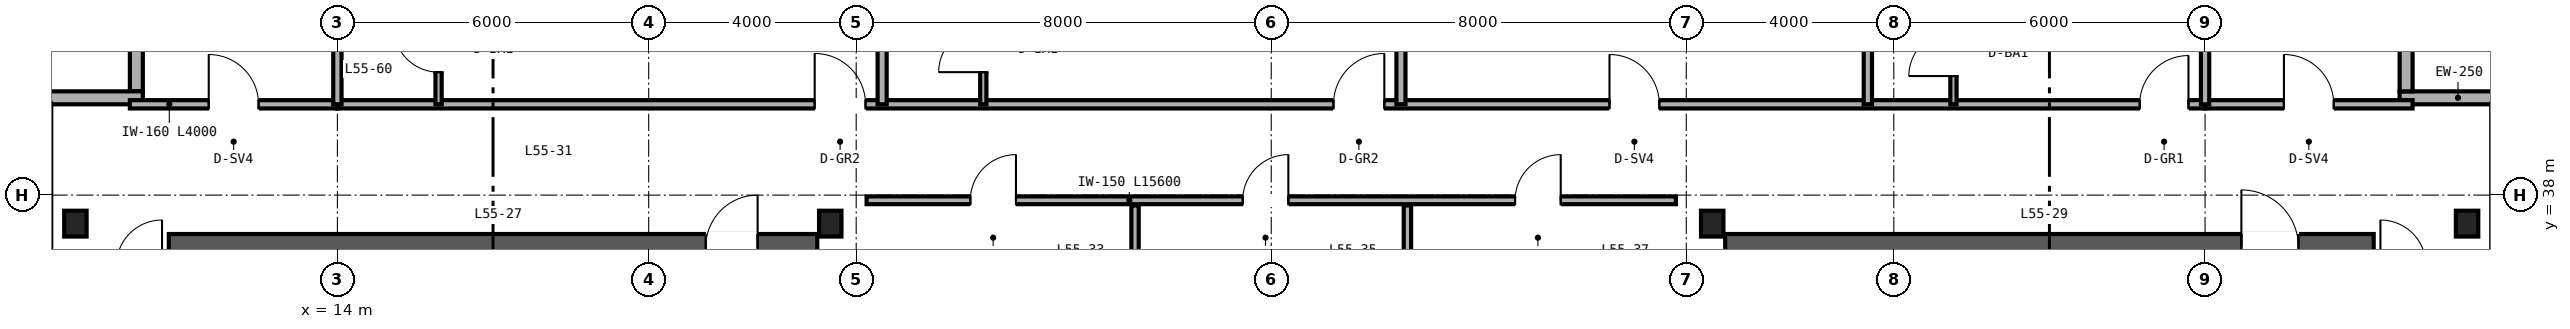
"""IFC4 building model, lengths in metres.
Left out: names, types, materials, properties, quantities, classifications, styles, units other than length and angle.
Written with IfcOpenShell. Run it as: python <this file> out.ifc"""

import sys

from ifc_helpers import new_model, si_unit, direction, frame, frame_2d, origin, origin_2d, place, context, subcontext, project, spatial, rectangle, i_section, extrude, source, transform, mapped, element, fill, save


model = new_model("IFC4")
c1 = context("Model", 3, precision=1e-05, world=origin(), true_north=direction((0.0, 1.0)))
c2 = subcontext(c1, "Body", "Model", "MODEL_VIEW")
j1 = project(units=[si_unit("LENGTHUNIT", "METRE"), si_unit("PLANEANGLEUNIT", "RADIAN")], contexts=[c1])
p1 = place(None, origin())
s1 = spatial("IfcSite", under=j1, at=p1, CompositionType="ELEMENT")
p2 = place(p1, origin())
s2 = spatial("IfcBuilding", under=s1, at=p2, CompositionType="ELEMENT")
p3 = place(p2, frame((0.0, 0.0, 217.2)))
s3 = spatial("IfcBuildingStorey", under=s2, at=p3, CompositionType="ELEMENT", Elevation=217.2)
p4 = place(p3, frame((10.75, 37.0, 0.0), z_axis=(0.0, 0.0, 1.0), x_axis=(1.0, 0.0, 0.0)))
e1 = element("IfcWall", 1, at=p4, inside=s3, PredefinedType="SHEAR", context=c2, shape_type="SweptSolid", body=[
    extrude(rectangle(XDim=12.5, YDim=0.5, at=frame_2d((6.25, 0.0))), origin(), (0.0, 0.0, 1.0), 3.28),
])
p5 = place(p4, frame((10.35, 0.0, 0.0)))
e2 = element("IfcOpeningElement", 2, at=p5, cuts=e1, PredefinedType="OPENING", context=c2, shape_type="SweptSolid", body=[
    extrude(rectangle(XDim=1.0, YDim=2.15, at=frame_2d((0.5, 1.075))), frame((0.0, 0.26, 0.0), z_axis=(0.0, -1.0, 0.0), x_axis=(1.0, 0.0, 0.0)), (0.0, 0.0, 1.0), 0.52),
])
p6 = place(p3, frame((40.75, 37.0, 0.0), z_axis=(0.0, 0.0, 1.0), x_axis=(1.0, 0.0, 0.0)))
e3 = element("IfcWall", 3, at=p6, inside=s3, PredefinedType="SHEAR", context=c2, shape_type="SweptSolid", body=[
    extrude(rectangle(XDim=12.5, YDim=0.5, at=frame_2d((6.25, 0.0))), origin(), (0.0, 0.0, 1.0), 3.28),
])
p7 = place(p6, frame((9.95, 0.0, 0.0)))
e4 = element("IfcOpeningElement", 4, at=p7, cuts=e3, PredefinedType="OPENING", context=c2, shape_type="SweptSolid", body=[
    extrude(rectangle(XDim=1.1, YDim=2.15, at=frame_2d((0.55, 1.075))), frame((0.0, 0.26, 0.0), z_axis=(0.0, -1.0, 0.0), x_axis=(1.0, 0.0, 0.0)), (0.0, 0.0, 1.0), 0.52),
])
m1 = source(origin(), c2, "Body", "SweptSolid", [
    extrude(i_section(OverallWidth=0.432, OverallDepth=0.498, WebThickness=0.056, FlangeThickness=0.089, FilletRadius=0.025, at=origin_2d()), origin(), (0.0, 0.0, 1.0), 3.28),
])
for number, where, z_axis, x_axis in (
    (5, (8.95, 37.45, 0.0), (0.0, 0.0, 1.0), (1.0, 0.0, 0.0)),
    (6, (23.5, 37.45, 0.0), (0.0, 0.0, 1.0), (1.0, 0.0, 0.0)),
    (7, (40.5, 37.45, 0.0), (0.0, 0.0, 1.0), (1.0, 0.0, 0.0)),
    (8, (55.05, 37.45, 0.0), (0.0, 0.0, 1.0), (1.0, 0.0, 0.0)),
):
    element("IfcColumn", number, at=place(p3, frame(where, z_axis=z_axis, x_axis=x_axis)), inside=s3, PredefinedType="COLUMN", context=c2, shape_type="MappedRepresentation", body=[
        mapped(m1, transform((0.0, 0.0, 0.0), scale=1.0)),
    ])
p8 = place(p3, frame((56.0, 39.875, 0.0), z_axis=(0.0, 0.0, 1.0), x_axis=(-1.0, 0.0, 0.0)))
e9 = element("IfcWall", 9, at=p8, inside=s3, PredefinedType="SOLIDWALL", context=c2, shape_type="SweptSolid", body=[
    extrude(rectangle(XDim=2.25, YDim=0.25, at=frame_2d((1.125, 0.0))), origin(), (0.0, 0.0, 1.0), 3.28),
])
for number, where, z_axis, x_axis in (
    (10, (53.875, 40.0, 0.0), (0.0, 0.0, 1.0), (0.0, 1.0, 0.0)),
    (11, (10.125, 42.0, 0.0), (0.0, 0.0, 1.0), (0.0, -1.0, 0.0)),
):
    element("IfcWall", number, at=place(p3, frame(where, z_axis=z_axis, x_axis=x_axis)), inside=s3, PredefinedType="SOLIDWALL", context=c2, shape_type="SweptSolid", body=[
        extrude(rectangle(XDim=2.0, YDim=0.25, at=frame_2d((1.0, 0.0))), origin(), (0.0, 0.0, 1.0), 3.28),
    ])
p9 = place(p3, frame((10.25, 39.875, 0.0), z_axis=(0.0, 0.0, 1.0), x_axis=(-1.0, 0.0, 0.0)))
e12 = element("IfcWall", 12, at=p9, inside=s3, PredefinedType="SOLIDWALL", context=c2, shape_type="SweptSolid", body=[
    extrude(rectangle(XDim=2.25, YDim=0.25, at=frame_2d((1.125, 0.0))), origin(), (0.0, 0.0, 1.0), 3.28),
])
p10 = place(p3, frame((24.2, 37.9, 0.0), z_axis=(0.0, 0.0, 1.0), x_axis=(1.0, 0.0, 0.0)))
e13 = element("IfcWall", 13, at=p10, inside=s3, PredefinedType="PARTITIONING", context=c2, shape_type="SweptSolid", body=[
    extrude(rectangle(XDim=15.6, YDim=0.15, at=frame_2d((7.8, 0.0))), origin(), (0.0, 0.0, 1.0), 3.28),
])
p11 = place(p10, frame((2.0, 0.0, 0.0)))
e14 = element("IfcOpeningElement", 14, at=p11, cuts=e13, PredefinedType="OPENING", context=c2, shape_type="SweptSolid", body=[
    extrude(rectangle(XDim=0.88, YDim=2.15, at=frame_2d((0.44, 1.075))), frame((0.0, 0.085, 0.0), z_axis=(0.0, -1.0, 0.0), x_axis=(1.0, 0.0, 0.0)), (0.0, 0.0, 1.0), 0.17),
])
p12 = place(p10, frame((7.25, 0.0, 0.0)))
e15 = element("IfcOpeningElement", 15, at=p12, cuts=e13, PredefinedType="OPENING", context=c2, shape_type="SweptSolid", body=[
    extrude(rectangle(XDim=0.88, YDim=2.15, at=frame_2d((0.44, 1.075))), frame((0.0, 0.085, 0.0), z_axis=(0.0, -1.0, 0.0), x_axis=(1.0, 0.0, 0.0)), (0.0, 0.0, 1.0), 0.17),
])
p13 = place(p10, frame((12.5, 0.0, 0.0)))
e16 = element("IfcOpeningElement", 16, at=p13, cuts=e13, PredefinedType="OPENING", context=c2, shape_type="SweptSolid", body=[
    extrude(rectangle(XDim=0.88, YDim=2.15, at=frame_2d((0.44, 1.075))), frame((0.0, 0.085, 0.0), z_axis=(0.0, -1.0, 0.0), x_axis=(1.0, 0.0, 0.0)), (0.0, 0.0, 1.0), 0.17),
])
for number, where, z_axis, x_axis in (
    (17, (29.375, 36.12, 0.0), (0.0, 0.0, 1.0), (0.0, 1.0, 0.0)),
    (18, (34.625, 36.12, 0.0), (0.0, 0.0, 1.0), (0.0, 1.0, 0.0)),
):
    element("IfcWall", number, at=place(p3, frame(where, z_axis=z_axis, x_axis=x_axis)), inside=s3, PredefinedType="PARTITIONING", context=c2, shape_type="SweptSolid", body=[
        extrude(rectangle(XDim=1.68, YDim=0.142, at=frame_2d((0.84, 0.0))), origin(), (0.0, 0.0, 1.0), 3.28),
    ])
p14 = place(p3, frame((10.0, 39.75, 0.0), z_axis=(0.0, 0.0, 1.0), x_axis=(1.0, 0.0, 0.0)))
e19 = element("IfcWall", 19, at=p14, inside=s3, PredefinedType="PARTITIONING", context=c2, shape_type="SweptSolid", body=[
    extrude(rectangle(XDim=4.0, YDim=0.16, at=frame_2d((2.0, 0.0))), origin(), (0.0, 0.0, 1.0), 3.28),
])
p15 = place(p14, frame((1.52, 0.0, 0.0)))
e20 = element("IfcOpeningElement", 20, at=p15, cuts=e19, PredefinedType="OPENING", context=c2, shape_type="SweptSolid", body=[
    extrude(rectangle(XDim=0.96, YDim=2.15, at=frame_2d((0.48, 1.075))), frame((0.0, 0.09, 0.0), z_axis=(0.0, -1.0, 0.0), x_axis=(1.0, 0.0, 0.0)), (0.0, 0.0, 1.0), 0.18),
])
p16 = place(p3, frame((50.0, 39.75, 0.0), z_axis=(0.0, 0.0, 1.0), x_axis=(1.0, 0.0, 0.0)))
e21 = element("IfcWall", 21, at=p16, inside=s3, PredefinedType="PARTITIONING", context=c2, shape_type="SweptSolid", body=[
    extrude(rectangle(XDim=4.0, YDim=0.16, at=frame_2d((2.0, 0.0))), origin(), (0.0, 0.0, 1.0), 3.28),
])
p17 = place(p16, frame((1.52, 0.0, 0.0)))
e22 = element("IfcOpeningElement", 22, at=p17, cuts=e21, PredefinedType="OPENING", context=c2, shape_type="SweptSolid", body=[
    extrude(rectangle(XDim=0.96, YDim=2.15, at=frame_2d((0.48, 1.075))), frame((0.0, 0.09, 0.0), z_axis=(0.0, -1.0, 0.0), x_axis=(1.0, 0.0, 0.0)), (0.0, 0.0, 1.0), 0.18),
])
p18 = place(p3, frame((14.0, 39.75, 0.0), z_axis=(0.0, 0.0, 1.0), x_axis=(1.0, 0.0, 0.0)))
e23 = element("IfcWall", 23, at=p18, inside=s3, PredefinedType="PARTITIONING", context=c2, shape_type="SweptSolid", body=[
    extrude(rectangle(XDim=36.0, YDim=0.16, at=frame_2d((18.0, 0.0))), origin(), (0.0, 0.0, 1.0), 2.823),
])
p19 = place(p18, frame((9.2, 0.0, 0.0)))
e24 = element("IfcOpeningElement", 24, at=p19, cuts=e23, PredefinedType="OPENING", context=c2, shape_type="SweptSolid", body=[
    extrude(rectangle(XDim=0.98, YDim=2.2, at=frame_2d((0.49, 1.1))), frame((0.0, 0.09, 0.0), z_axis=(0.0, -1.0, 0.0), x_axis=(1.0, 0.0, 0.0)), (0.0, 0.0, 1.0), 0.18),
])
p20 = place(p18, frame((19.2, 0.0, 0.0)))
e25 = element("IfcOpeningElement", 25, at=p20, cuts=e23, PredefinedType="OPENING", context=c2, shape_type="SweptSolid", body=[
    extrude(rectangle(XDim=0.98, YDim=2.2, at=frame_2d((0.49, 1.1))), frame((0.0, 0.09, 0.0), z_axis=(0.0, -1.0, 0.0), x_axis=(1.0, 0.0, 0.0)), (0.0, 0.0, 1.0), 0.18),
])
p21 = place(p18, frame((24.52, 0.0, 0.0)))
e26 = element("IfcOpeningElement", 26, at=p21, cuts=e23, PredefinedType="OPENING", context=c2, shape_type="SweptSolid", body=[
    extrude(rectangle(XDim=0.96, YDim=2.15, at=frame_2d((0.48, 1.075))), frame((0.0, 0.09, 0.0), z_axis=(0.0, -1.0, 0.0), x_axis=(1.0, 0.0, 0.0)), (0.0, 0.0, 1.0), 0.18),
])
p22 = place(p18, frame((34.74, 0.0, 0.0)))
e27 = element("IfcOpeningElement", 27, at=p22, cuts=e23, PredefinedType="OPENING", context=c2, shape_type="SweptSolid", body=[
    extrude(rectangle(XDim=0.94, YDim=2.15, at=frame_2d((0.47, 1.075))), frame((0.0, 0.09, 0.0), z_axis=(0.0, -1.0, 0.0), x_axis=(1.0, 0.0, 0.0)), (0.0, 0.0, 1.0), 0.18),
])
for number, where, z_axis, x_axis in (
    (28, (14.0, 39.75, 0.0), (0.0, 0.0, 1.0), (0.0, 1.0, 0.0)),
    (29, (50.0, 39.75, 0.0), (0.0, 0.0, 1.0), (0.0, 1.0, 0.0)),
):
    element("IfcWall", number, at=place(p3, frame(where, z_axis=z_axis, x_axis=x_axis)), inside=s3, PredefinedType="PARTITIONING", context=c2, shape_type="SweptSolid", body=[
        extrude(rectangle(XDim=5.89, YDim=0.16, at=frame_2d((2.945, 0.0))), origin(), (0.0, 0.0, 1.0), 2.587),
    ])
p23 = place(p3, frame((24.5, 39.75, 0.0), z_axis=(0.0, 0.0, 1.0), x_axis=(0.0, 1.0, 0.0)))
e30 = element("IfcWall", 30, at=p23, inside=s3, PredefinedType="PARTITIONING", context=c2, shape_type="SweptSolid", body=[
    extrude(rectangle(XDim=5.89, YDim=0.175, at=frame_2d((2.945, 0.0))), origin(), (0.0, 0.0, 1.0), 2.36),
])
p24 = place(p3, frame((15.95, 39.75, 0.0), z_axis=(0.0, 0.0, 1.0), x_axis=(0.0, 1.0, 0.0)))
e31 = element("IfcWall", 31, at=p24, inside=s3, PredefinedType="PARTITIONING", context=c2, shape_type="SweptSolid", body=[
    extrude(rectangle(XDim=2.1, YDim=0.12, at=frame_2d((1.05, 0.0))), origin(), (0.0, 0.0, 1.0), 3.28),
])
p25 = place(p24, frame((0.62, 0.0, 0.0)))
e32 = element("IfcOpeningElement", 32, at=p25, cuts=e31, PredefinedType="OPENING", context=c2, shape_type="SweptSolid", body=[
    extrude(rectangle(XDim=0.86, YDim=2.1, at=frame_2d((0.43, 1.05))), frame((0.0, 0.07, 0.0), z_axis=(0.0, -1.0, 0.0), x_axis=(1.0, 0.0, 0.0)), (0.0, 0.0, 1.0), 0.14),
])
p26 = place(p3, frame((34.5, 39.75, 0.0), z_axis=(0.0, 0.0, 1.0), x_axis=(0.0, 1.0, 0.0)))
e33 = element("IfcWall", 33, at=p26, inside=s3, PredefinedType="PARTITIONING", context=c2, shape_type="SweptSolid", body=[
    extrude(rectangle(XDim=5.89, YDim=0.175, at=frame_2d((2.945, 0.0))), origin(), (0.0, 0.0, 1.0), 2.36),
])
p27 = place(p3, frame((26.45, 39.75, 0.0), z_axis=(0.0, 0.0, 1.0), x_axis=(0.0, 1.0, 0.0)))
e34 = element("IfcWall", 34, at=p27, inside=s3, PredefinedType="PARTITIONING", context=c2, shape_type="SweptSolid", body=[
    extrude(rectangle(XDim=2.1, YDim=0.12, at=frame_2d((1.05, 0.0))), origin(), (0.0, 0.0, 1.0), 3.28),
])
p28 = place(p27, frame((0.62, 0.0, 0.0)))
e35 = element("IfcOpeningElement", 35, at=p28, cuts=e34, PredefinedType="OPENING", context=c2, shape_type="SweptSolid", body=[
    extrude(rectangle(XDim=0.86, YDim=2.1, at=frame_2d((0.43, 1.05))), frame((0.0, 0.07, 0.0), z_axis=(0.0, -1.0, 0.0), x_axis=(1.0, 0.0, 0.0)), (0.0, 0.0, 1.0), 0.14),
])
p29 = place(p3, frame((43.5, 39.75, 0.0), z_axis=(0.0, 0.0, 1.0), x_axis=(0.0, 1.0, 0.0)))
e36 = element("IfcWall", 36, at=p29, inside=s3, PredefinedType="PARTITIONING", context=c2, shape_type="SweptSolid", body=[
    extrude(rectangle(XDim=5.89, YDim=0.16, at=frame_2d((2.945, 0.0))), origin(), (0.0, 0.0, 1.0), 2.743),
])
p30 = place(p3, frame((45.15, 39.75, 0.0), z_axis=(0.0, 0.0, 1.0), x_axis=(0.0, 1.0, 0.0)))
e37 = element("IfcWall", 37, at=p30, inside=s3, PredefinedType="PARTITIONING", context=c2, shape_type="SweptSolid", body=[
    extrude(rectangle(XDim=1.95, YDim=0.12, at=frame_2d((0.975, 0.0))), origin(), (0.0, 0.0, 1.0), 3.28),
])
p31 = place(p30, frame((0.545, 0.0, 0.0)))
e38 = element("IfcOpeningElement", 38, at=p31, cuts=e37, PredefinedType="OPENING", context=c2, shape_type="SweptSolid", body=[
    extrude(rectangle(XDim=0.86, YDim=2.1, at=frame_2d((0.43, 1.05))), frame((0.0, 0.07, 0.0), z_axis=(0.0, -1.0, 0.0), x_axis=(1.0, 0.0, 0.0)), (0.0, 0.0, 1.0), 0.14),
])
m2 = source(origin(), c2, "Body", "SweptSolid", [
    extrude(rectangle(XDim=1.0, YDim=2.15, at=frame_2d((0.5, 1.075))), frame((0.0, 0.025, 0.0), z_axis=(0.0, -1.0, 0.0), x_axis=(1.0, 0.0, 0.0)), (0.0, 0.0, 1.0), 0.05),
])
p32 = place(p5, origin())
e39 = element("IfcDoor", 39, at=p32, inside=s3, OperationType="SINGLE_SWING_RIGHT", PredefinedType="DOOR", context=c2, shape_type="MappedRepresentation", body=[
    mapped(m2, transform((0.0, 0.0, 0.0), scale=1.0)),
])
fill(e2, e39)
m3 = source(origin(), c2, "Body", "SweptSolid", [
    extrude(rectangle(XDim=1.1, YDim=2.15, at=frame_2d((0.55, 1.075))), frame((0.0, 0.025, 0.0), z_axis=(0.0, -1.0, 0.0), x_axis=(1.0, 0.0, 0.0)), (0.0, 0.0, 1.0), 0.05),
])
p33 = place(p7, origin())
e40 = element("IfcDoor", 40, at=p33, inside=s3, OperationType="SINGLE_SWING_LEFT", PredefinedType="DOOR", context=c2, shape_type="MappedRepresentation", body=[
    mapped(m3, transform((0.0, 0.0, 0.0), scale=1.0)),
])
fill(e4, e40)
m4 = source(origin(), c2, "Body", "SweptSolid", [
    extrude(rectangle(XDim=0.88, YDim=2.15, at=frame_2d((0.44, 1.075))), frame((0.0, 0.025, 0.0), z_axis=(0.0, -1.0, 0.0), x_axis=(1.0, 0.0, 0.0)), (0.0, 0.0, 1.0), 0.05),
])
p34 = place(p11, origin())
e41 = element("IfcDoor", 41, at=p34, inside=s3, OperationType="SINGLE_SWING_RIGHT", PredefinedType="DOOR", context=c2, shape_type="MappedRepresentation", body=[
    mapped(m4, transform((0.0, 0.0, 0.0), scale=1.0)),
])
fill(e14, e41)
p35 = place(p12, origin())
e42 = element("IfcDoor", 42, at=p35, inside=s3, OperationType="SINGLE_SWING_RIGHT", PredefinedType="DOOR", context=c2, shape_type="MappedRepresentation", body=[
    mapped(m4, transform((0.0, 0.0, 0.0), scale=1.0)),
])
fill(e15, e42)
p36 = place(p13, origin())
e43 = element("IfcDoor", 43, at=p36, inside=s3, OperationType="SINGLE_SWING_RIGHT", PredefinedType="DOOR", context=c2, shape_type="MappedRepresentation", body=[
    mapped(m4, transform((0.0, 0.0, 0.0), scale=1.0)),
])
fill(e16, e43)
m5 = source(origin(), c2, "Body", "SweptSolid", [
    extrude(rectangle(XDim=0.96, YDim=2.15, at=frame_2d((0.48, 1.075))), frame((0.0, 0.025, 0.0), z_axis=(0.0, -1.0, 0.0), x_axis=(1.0, 0.0, 0.0)), (0.0, 0.0, 1.0), 0.05),
])
p37 = place(p15, origin())
e44 = element("IfcDoor", 44, at=p37, inside=s3, OperationType="SINGLE_SWING_LEFT", PredefinedType="DOOR", context=c2, shape_type="MappedRepresentation", body=[
    mapped(m5, transform((0.0, 0.0, 0.0), scale=1.0)),
])
fill(e20, e44)
p38 = place(p17, origin())
e45 = element("IfcDoor", 45, at=p38, inside=s3, OperationType="SINGLE_SWING_LEFT", PredefinedType="DOOR", context=c2, shape_type="MappedRepresentation", body=[
    mapped(m5, transform((0.0, 0.0, 0.0), scale=1.0)),
])
fill(e22, e45)
m6 = source(origin(), c2, "Body", "SweptSolid", [
    extrude(rectangle(XDim=0.86, YDim=2.1, at=frame_2d((0.43, 1.05))), frame((0.0, 0.025, 0.0), z_axis=(0.0, -1.0, 0.0), x_axis=(1.0, 0.0, 0.0)), (0.0, 0.0, 1.0), 0.05),
])
p39 = place(p25, origin())
e46 = element("IfcDoor", 46, at=p39, inside=s3, OperationType="SINGLE_SWING_RIGHT", PredefinedType="DOOR", context=c2, shape_type="MappedRepresentation", body=[
    mapped(m6, transform((0.0, 0.0, 0.0), scale=1.0)),
])
fill(e32, e46)
p40 = place(p28, origin())
e47 = element("IfcDoor", 47, at=p40, inside=s3, OperationType="SINGLE_SWING_LEFT", PredefinedType="DOOR", context=c2, shape_type="MappedRepresentation", body=[
    mapped(m6, transform((0.0, 0.0, 0.0), scale=1.0)),
])
fill(e35, e47)
p41 = place(p31, origin())
e48 = element("IfcDoor", 48, at=p41, inside=s3, OperationType="SINGLE_SWING_LEFT", PredefinedType="DOOR", context=c2, shape_type="MappedRepresentation", body=[
    mapped(m6, transform((0.0, 0.0, 0.0), scale=1.0)),
])
fill(e38, e48)
m7 = source(origin(), c2, "Body", "SweptSolid", [
    extrude(rectangle(XDim=0.98, YDim=2.2, at=frame_2d((0.49, 1.1))), frame((0.0, 0.025, 0.0), z_axis=(0.0, -1.0, 0.0), x_axis=(1.0, 0.0, 0.0)), (0.0, 0.0, 1.0), 0.05),
])
p42 = place(p19, origin())
e49 = element("IfcDoor", 49, at=p42, inside=s3, OperationType="SINGLE_SWING_LEFT", PredefinedType="DOOR", context=c2, shape_type="MappedRepresentation", body=[
    mapped(m7, transform((0.0, 0.0, 0.0), scale=1.0)),
])
fill(e24, e49)
p43 = place(p20, origin())
e50 = element("IfcDoor", 50, at=p43, inside=s3, OperationType="SINGLE_SWING_RIGHT", PredefinedType="DOOR", context=c2, shape_type="MappedRepresentation", body=[
    mapped(m7, transform((0.0, 0.0, 0.0), scale=1.0)),
])
fill(e25, e50)
p44 = place(p21, origin())
e51 = element("IfcDoor", 51, at=p44, inside=s3, OperationType="SINGLE_SWING_LEFT", PredefinedType="DOOR", context=c2, shape_type="MappedRepresentation", body=[
    mapped(m5, transform((0.0, 0.0, 0.0), scale=1.0)),
])
fill(e26, e51)
m8 = source(origin(), c2, "Body", "SweptSolid", [
    extrude(rectangle(XDim=0.94, YDim=2.15, at=frame_2d((0.47, 1.075))), frame((0.0, 0.025, 0.0), z_axis=(0.0, -1.0, 0.0), x_axis=(1.0, 0.0, 0.0)), (0.0, 0.0, 1.0), 0.05),
])
p45 = place(p22, origin())
e52 = element("IfcDoor", 52, at=p45, inside=s3, OperationType="SINGLE_SWING_RIGHT", PredefinedType="DOOR", context=c2, shape_type="MappedRepresentation", body=[
    mapped(m8, transform((0.0, 0.0, 0.0), scale=1.0)),
])
fill(e27, e52)
save(model, sys.argv[1])
